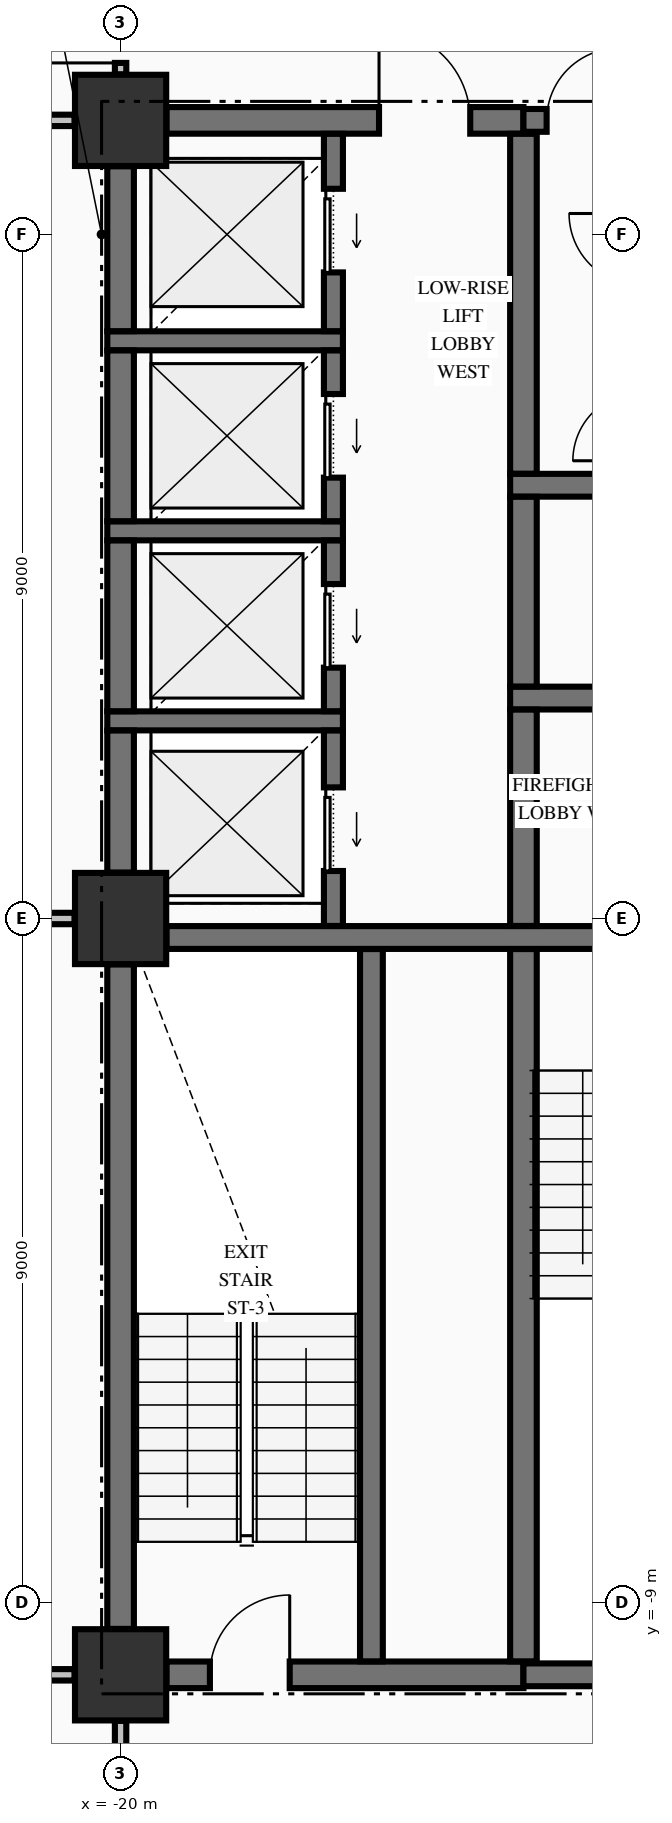
"""IFC4 building model, lengths in metres.
Left out: names, types, materials, properties, quantities, classifications, styles, units other than length and angle.
Written with IfcOpenShell. Run it as: python <this file> out.ifc"""

import sys

from ifc_helpers import new_model, si_unit, direction, frame, frame_2d, origin, origin_2d, place, context, subcontext, project, spatial, rectangle, extrude, element, fill, save


model = new_model("IFC4")
c1 = context("Model", 3, precision=1e-05, world=origin(), true_north=direction((0.0, 1.0)))
c2 = subcontext(c1, "Body", "Model", "MODEL_VIEW")
j1 = project(units=[si_unit("LENGTHUNIT", "METRE"), si_unit("PLANEANGLEUNIT", "RADIAN")], contexts=[c1])
p1 = place(None, origin())
s1 = spatial("IfcSite", under=j1, at=p1, CompositionType="ELEMENT")
p2 = place(p1, origin())
s2 = spatial("IfcBuilding", under=s1, at=p2, CompositionType="ELEMENT")
p3 = place(p2, frame((0.0, 0.0, 41.48)))
s3 = spatial("IfcBuildingStorey", under=s2, at=p3, CompositionType="ELEMENT", Elevation=41.48)
for number, where, z_axis, x_axis in (
    (1, (-20.0, -9.95, -0.25), (0.0, 0.0, 1.0), (1.0, 0.0, 0.0)),
    (2, (-20.0, 10.5, -0.25), (0.0, 0.0, 1.0), (1.0, 0.0, 0.0)),
    (3, (-20.0, 0.0, -0.25), (0.0, 0.0, 1.0), (1.0, 0.0, 0.0)),
):
    element("IfcColumn", number, at=place(p3, frame(where, z_axis=z_axis, x_axis=x_axis)), inside=s3, PredefinedType="COLUMN", context=c2, shape_type="SweptSolid", body=[
        extrude(rectangle(XDim=1.2, YDim=1.2, at=origin_2d()), origin(), (0.0, 0.0, 1.0), 3.57),
    ])
p4 = place(p3, frame((-19.396, -9.95, 0.0), z_axis=(0.0, 0.0, 1.0), x_axis=(1.0, 0.0, 0.0)))
e4 = element("IfcWall", 4, at=p4, inside=s3, PredefinedType="SHEAR", context=c2, shape_type="SweptSolid", body=[
    extrude(rectangle(XDim=4.696, YDim=0.35, at=frame_2d((2.348, 0.0))), origin(), (0.0, 0.0, 1.0), 3.32),
])
p5 = place(p4, frame((0.571, 0.0, 0.0)))
e5 = element("IfcOpeningElement", 5, at=p5, cuts=e4, PredefinedType="OPENING", context=c2, shape_type="SweptSolid", body=[
    extrude(rectangle(XDim=1.05, YDim=2.15, at=frame_2d((0.525, 1.075))), frame((0.0, 0.185, 0.0), z_axis=(0.0, -1.0, 0.0), x_axis=(1.0, 0.0, 0.0)), (0.0, 0.0, 1.0), 0.37),
])
p6 = place(p3, frame((-14.7, -9.95, 0.0), z_axis=(0.0, 0.0, 1.0), x_axis=(1.0, 0.0, 0.0)))
e6 = element("IfcWall", 6, at=p6, inside=s3, PredefinedType="SHEAR", context=c2, shape_type="SweptSolid", body=[
    extrude(rectangle(XDim=3.096, YDim=0.3, at=frame_2d((1.548, 0.0))), origin(), (0.0, 0.0, 1.0), 3.32),
])
p7 = place(p3, frame((-19.396, -0.25, 0.0), z_axis=(0.0, 0.0, 1.0), x_axis=(1.0, 0.0, 0.0)))
e7 = element("IfcWall", 7, at=p7, inside=s3, PredefinedType="SHEAR", context=c2, shape_type="SweptSolid", body=[
    extrude(rectangle(XDim=7.792, YDim=0.3, at=frame_2d((3.896, 0.0))), origin(), (0.0, 0.0, 1.0), 3.32),
])
p8 = place(p7, frame((5.696, 0.0, 0.0)))
e8 = element("IfcOpeningElement", 8, at=p8, cuts=e7, PredefinedType="OPENING", context=c2, shape_type="SweptSolid", body=[
    extrude(rectangle(XDim=1.1, YDim=2.15, at=frame_2d((0.55, 1.075))), frame((0.0, 0.16, 0.0), z_axis=(0.0, -1.0, 0.0), x_axis=(1.0, 0.0, 0.0)), (0.0, 0.0, 1.0), 0.32),
])
p9 = place(p3, frame((-20.175, 2.6, 0.0), z_axis=(0.0, 0.0, 1.0), x_axis=(1.0, 0.0, 0.0)))
e9 = element("IfcWall", 9, at=p9, inside=s3, PredefinedType="SOLIDWALL", context=c2, shape_type="SweptSolid", body=[
    extrude(rectangle(XDim=3.1, YDim=0.25, at=frame_2d((1.55, 0.0))), origin(), (0.0, 0.0, 1.0), 3.32),
])
p10 = place(p3, frame((-14.875, 2.9, 0.0), z_axis=(0.0, 0.0, 1.0), x_axis=(1.0, 0.0, 0.0)))
e10 = element("IfcWall", 10, at=p10, inside=s3, PredefinedType="SHEAR", context=c2, shape_type="SweptSolid", body=[
    extrude(rectangle(XDim=4.025, YDim=0.3, at=frame_2d((2.012, 0.0))), origin(), (0.0, 0.0, 1.0), 3.32),
])
p11 = place(p10, frame((2.075, 0.0, 0.0)))
e11 = element("IfcOpeningElement", 11, at=p11, cuts=e10, PredefinedType="OPENING", context=c2, shape_type="SweptSolid", body=[
    extrude(rectangle(XDim=1.1, YDim=2.2, at=frame_2d((0.55, 1.1))), frame((0.0, 0.16, 0.0), z_axis=(0.0, -1.0, 0.0), x_axis=(1.0, 0.0, 0.0)), (0.0, 0.0, 1.0), 0.32),
])
p12 = place(p3, frame((-20.175, 5.1, 0.0), z_axis=(0.0, 0.0, 1.0), x_axis=(1.0, 0.0, 0.0)))
e12 = element("IfcWall", 12, at=p12, inside=s3, PredefinedType="SOLIDWALL", context=c2, shape_type="SweptSolid", body=[
    extrude(rectangle(XDim=3.1, YDim=0.25, at=frame_2d((1.55, 0.0))), origin(), (0.0, 0.0, 1.0), 3.32),
])
p13 = place(p3, frame((-14.875, 5.7, 0.0), z_axis=(0.0, 0.0, 1.0), x_axis=(1.0, 0.0, 0.0)))
e13 = element("IfcWall", 13, at=p13, inside=s3, PredefinedType="SHEAR", context=c2, shape_type="SweptSolid", body=[
    extrude(rectangle(XDim=4.025, YDim=0.3, at=frame_2d((2.012, 0.0))), origin(), (0.0, 0.0, 1.0), 3.32),
])
p14 = place(p3, frame((-20.175, 7.6, 0.0), z_axis=(0.0, 0.0, 1.0), x_axis=(1.0, 0.0, 0.0)))
e14 = element("IfcWall", 14, at=p14, inside=s3, PredefinedType="SOLIDWALL", context=c2, shape_type="SweptSolid", body=[
    extrude(rectangle(XDim=3.1, YDim=0.25, at=frame_2d((1.55, 0.0))), origin(), (0.0, 0.0, 1.0), 3.32),
])
p15 = place(p3, frame((-19.396, 10.5, 0.0), z_axis=(0.0, 0.0, 1.0), x_axis=(1.0, 0.0, 0.0)))
e15 = element("IfcWall", 15, at=p15, inside=s3, PredefinedType="SHEAR", context=c2, shape_type="SweptSolid", body=[
    extrude(rectangle(XDim=4.696, YDim=0.35, at=frame_2d((2.348, 0.0))), origin(), (0.0, 0.0, 1.0), 3.32),
])
p16 = place(p15, frame((2.796, 0.0, 0.0)))
e16 = element("IfcOpeningElement", 16, at=p16, cuts=e15, PredefinedType="OPENING", context=c2, shape_type="SweptSolid", body=[
    extrude(rectangle(XDim=1.2, YDim=2.15, at=frame_2d((0.6, 1.075))), frame((0.0, 0.185, 0.0), z_axis=(0.0, -1.0, 0.0), x_axis=(1.0, 0.0, 0.0)), (0.0, 0.0, 1.0), 0.37),
])
p17 = place(p3, frame((-14.7, 10.5, 0.0), z_axis=(0.0, 0.0, 1.0), x_axis=(1.0, 0.0, 0.0)))
e17 = element("IfcWall", 17, at=p17, inside=s3, PredefinedType="SHEAR", context=c2, shape_type="SweptSolid", body=[
    extrude(rectangle(XDim=3.096, YDim=0.3, at=frame_2d((1.548, 0.0))), origin(), (0.0, 0.0, 1.0), 3.32),
])
p18 = place(p17, frame((0.305, 0.0, 0.0)))
e18 = element("IfcOpeningElement", 18, at=p18, cuts=e17, PredefinedType="OPENING", context=c2, shape_type="SweptSolid", body=[
    extrude(rectangle(XDim=0.95, YDim=2.15, at=frame_2d((0.475, 1.075))), frame((0.0, 0.16, 0.0), z_axis=(0.0, -1.0, 0.0), x_axis=(1.0, 0.0, 0.0)), (0.0, 0.0, 1.0), 0.32),
])
p19 = place(p3, frame((-23.835, -9.95, 0.0), z_axis=(0.0, 0.0, 1.0), x_axis=(1.0, 0.0, 0.0)))
e19 = element("IfcWall", 19, at=p19, inside=s3, PredefinedType="PARTITIONING", context=c2, shape_type="SweptSolid", body=[
    extrude(rectangle(XDim=3.229, YDim=0.15, at=frame_2d((1.615, 0.0))), origin(), (0.0, 0.0, 1.0), 3.32),
])
p20 = place(p19, frame((1.36, 0.0, 0.0)))
e20 = element("IfcOpeningElement", 20, at=p20, cuts=e19, PredefinedType="OPENING", context=c2, shape_type="SweptSolid", body=[
    extrude(rectangle(XDim=0.95, YDim=2.15, at=frame_2d((0.475, 1.075))), frame((0.0, 0.085, 0.0), z_axis=(0.0, -1.0, 0.0), x_axis=(1.0, 0.0, 0.0)), (0.0, 0.0, 1.0), 0.17),
])
p21 = place(p3, frame((-23.294, 0.0, 0.0), z_axis=(0.0, 0.0, 1.0), x_axis=(1.0, 0.0, 0.0)))
e21 = element("IfcWall", 21, at=p21, inside=s3, PredefinedType="PARTITIONING", context=c2, shape_type="SweptSolid", body=[
    extrude(rectangle(XDim=2.688, YDim=0.15, at=frame_2d((1.344, 0.0))), origin(), (0.0, 0.0, 1.0), 2.66),
])
p22 = place(p3, frame((-23.835, 10.5, 0.0), z_axis=(0.0, 0.0, 1.0), x_axis=(1.0, 0.0, 0.0)))
e22 = element("IfcWall", 22, at=p22, inside=s3, PredefinedType="PARTITIONING", context=c2, shape_type="SweptSolid", body=[
    extrude(rectangle(XDim=3.229, YDim=0.15, at=frame_2d((1.615, 0.0))), origin(), (0.0, 0.0, 1.0), 3.32),
])
p23 = place(p22, frame((1.36, 0.0, 0.0)))
e23 = element("IfcOpeningElement", 23, at=p23, cuts=e22, PredefinedType="OPENING", context=c2, shape_type="SweptSolid", body=[
    extrude(rectangle(XDim=0.95, YDim=2.15, at=frame_2d((0.475, 1.075))), frame((0.0, 0.085, 0.0), z_axis=(0.0, -1.0, 0.0), x_axis=(1.0, 0.0, 0.0)), (0.0, 0.0, 1.0), 0.17),
])
p24 = place(p3, frame((-20.0, -9.346, 0.0), z_axis=(0.0, 0.0, 1.0), x_axis=(0.0, 1.0, 0.0)))
e24 = element("IfcWall", 24, at=p24, inside=s3, PredefinedType="SHEAR", context=c2, shape_type="SweptSolid", body=[
    extrude(rectangle(XDim=8.742, YDim=0.35, at=frame_2d((4.371, 0.0))), origin(), (0.0, 0.0, 1.0), 3.32),
])
p25 = place(p3, frame((-20.0, 0.604, 0.0), z_axis=(0.0, 0.0, 1.0), x_axis=(0.0, 1.0, 0.0)))
e25 = element("IfcWall", 25, at=p25, inside=s3, PredefinedType="SHEAR", context=c2, shape_type="SweptSolid", body=[
    extrude(rectangle(XDim=1.869, YDim=0.35, at=frame_2d((0.935, 0.0))), origin(), (0.0, 0.0, 1.0), 3.32),
])
for number, where, z_axis, x_axis in (
    (26, (-20.0, 2.727, 0.0), (0.0, 0.0, 1.0), (0.0, 1.0, 0.0)),
    (27, (-20.0, 5.227, 0.0), (0.0, 0.0, 1.0), (0.0, 1.0, 0.0)),
):
    element("IfcWall", number, at=place(p3, frame(where, z_axis=z_axis, x_axis=x_axis)), inside=s3, PredefinedType="SHEAR", context=c2, shape_type="SweptSolid", body=[
        extrude(rectangle(XDim=2.246, YDim=0.35, at=frame_2d((1.123, 0.0))), origin(), (0.0, 0.0, 1.0), 3.32),
    ])
p26 = place(p3, frame((-20.0, 7.727, 0.0), z_axis=(0.0, 0.0, 1.0), x_axis=(0.0, 1.0, 0.0)))
e28 = element("IfcWall", 28, at=p26, inside=s3, PredefinedType="SHEAR", context=c2, shape_type="SweptSolid", body=[
    extrude(rectangle(XDim=2.169, YDim=0.35, at=frame_2d((1.084, 0.0))), origin(), (0.0, 0.0, 1.0), 3.32),
])
p27 = place(p3, frame((-17.2, -0.098, 0.0), z_axis=(0.0, 0.0, 1.0), x_axis=(0.0, 1.0, 0.0)))
e29 = element("IfcWall", 29, at=p27, inside=s3, PredefinedType="SOLIDWALL", context=c2, shape_type="SweptSolid", body=[
    extrude(rectangle(XDim=2.571, YDim=0.25, at=frame_2d((1.285, 0.0))), origin(), (0.0, 0.0, 1.0), 3.32),
])
p28 = place(p27, frame((0.723, 0.0, 0.0)))
e30 = element("IfcOpeningElement", 30, at=p28, cuts=e29, PredefinedType="OPENING", context=c2, shape_type="SweptSolid", body=[
    extrude(rectangle(XDim=1.1, YDim=2.2, at=frame_2d((0.55, 1.1))), frame((0.0, 0.135, 0.0), z_axis=(0.0, -1.0, 0.0), x_axis=(1.0, 0.0, 0.0)), (0.0, 0.0, 1.0), 0.27),
])
p29 = place(p3, frame((-17.2, 2.727, 0.0), z_axis=(0.0, 0.0, 1.0), x_axis=(0.0, 1.0, 0.0)))
e31 = element("IfcWall", 31, at=p29, inside=s3, PredefinedType="SOLIDWALL", context=c2, shape_type="SweptSolid", body=[
    extrude(rectangle(XDim=2.246, YDim=0.25, at=frame_2d((1.123, 0.0))), origin(), (0.0, 0.0, 1.0), 3.32),
])
p30 = place(p29, frame((0.573, 0.0, 0.0)))
e32 = element("IfcOpeningElement", 32, at=p30, cuts=e31, PredefinedType="OPENING", context=c2, shape_type="SweptSolid", body=[
    extrude(rectangle(XDim=1.1, YDim=2.2, at=frame_2d((0.55, 1.1))), frame((0.0, 0.135, 0.0), z_axis=(0.0, -1.0, 0.0), x_axis=(1.0, 0.0, 0.0)), (0.0, 0.0, 1.0), 0.27),
])
p31 = place(p3, frame((-17.2, 5.227, 0.0), z_axis=(0.0, 0.0, 1.0), x_axis=(0.0, 1.0, 0.0)))
e33 = element("IfcWall", 33, at=p31, inside=s3, PredefinedType="SOLIDWALL", context=c2, shape_type="SweptSolid", body=[
    extrude(rectangle(XDim=2.246, YDim=0.25, at=frame_2d((1.123, 0.0))), origin(), (0.0, 0.0, 1.0), 3.32),
])
p32 = place(p31, frame((0.573, 0.0, 0.0)))
e34 = element("IfcOpeningElement", 34, at=p32, cuts=e33, PredefinedType="OPENING", context=c2, shape_type="SweptSolid", body=[
    extrude(rectangle(XDim=1.1, YDim=2.2, at=frame_2d((0.55, 1.1))), frame((0.0, 0.135, 0.0), z_axis=(0.0, -1.0, 0.0), x_axis=(1.0, 0.0, 0.0)), (0.0, 0.0, 1.0), 0.27),
])
p33 = place(p3, frame((-17.2, 7.727, 0.0), z_axis=(0.0, 0.0, 1.0), x_axis=(0.0, 1.0, 0.0)))
e35 = element("IfcWall", 35, at=p33, inside=s3, PredefinedType="SOLIDWALL", context=c2, shape_type="SweptSolid", body=[
    extrude(rectangle(XDim=2.596, YDim=0.25, at=frame_2d((1.298, 0.0))), origin(), (0.0, 0.0, 1.0), 3.32),
])
p34 = place(p33, frame((0.773, 0.0, 0.0)))
e36 = element("IfcOpeningElement", 36, at=p34, cuts=e35, PredefinedType="OPENING", context=c2, shape_type="SweptSolid", body=[
    extrude(rectangle(XDim=1.1, YDim=2.2, at=frame_2d((0.55, 1.1))), frame((0.0, 0.135, 0.0), z_axis=(0.0, -1.0, 0.0), x_axis=(1.0, 0.0, 0.0)), (0.0, 0.0, 1.0), 0.27),
])
p35 = place(p3, frame((-16.7, -9.773, 0.0), z_axis=(0.0, 0.0, 1.0), x_axis=(0.0, 1.0, 0.0)))
e37 = element("IfcWall", 37, at=p35, inside=s3, PredefinedType="SHEAR", context=c2, shape_type="SweptSolid", body=[
    extrude(rectangle(XDim=9.371, YDim=0.3, at=frame_2d((4.686, 0.0))), origin(), (0.0, 0.0, 1.0), 3.32),
])
p36 = place(p3, frame((-14.7, -9.773, 0.0), z_axis=(0.0, 0.0, 1.0), x_axis=(0.0, 1.0, 0.0)))
e38 = element("IfcWall", 38, at=p36, inside=s3, PredefinedType="SHEAR", context=c2, shape_type="SweptSolid", body=[
    extrude(rectangle(XDim=9.371, YDim=0.35, at=frame_2d((4.686, 0.0))), origin(), (0.0, 0.0, 1.0), 3.32),
])
p37 = place(p3, frame((-14.7, -0.098, 0.0), z_axis=(0.0, 0.0, 1.0), x_axis=(0.0, 1.0, 0.0)))
e39 = element("IfcWall", 39, at=p37, inside=s3, PredefinedType="SHEAR", context=c2, shape_type="SweptSolid", body=[
    extrude(rectangle(XDim=2.846, YDim=0.35, at=frame_2d((1.423, 0.0))), origin(), (0.0, 0.0, 1.0), 3.32),
])
p38 = place(p3, frame((-14.7, 3.052, 0.0), z_axis=(0.0, 0.0, 1.0), x_axis=(0.0, 1.0, 0.0)))
e40 = element("IfcWall", 40, at=p38, inside=s3, PredefinedType="SHEAR", context=c2, shape_type="SweptSolid", body=[
    extrude(rectangle(XDim=2.496, YDim=0.35, at=frame_2d((1.248, 0.0))), origin(), (0.0, 0.0, 1.0), 3.32),
])
p39 = place(p3, frame((-14.7, 5.852, 0.0), z_axis=(0.0, 0.0, 1.0), x_axis=(0.0, 1.0, 0.0)))
e41 = element("IfcWall", 41, at=p39, inside=s3, PredefinedType="SHEAR", context=c2, shape_type="SweptSolid", body=[
    extrude(rectangle(XDim=4.471, YDim=0.35, at=frame_2d((2.235, 0.0))), origin(), (0.0, 0.0, 1.0), 3.32),
])
p40 = place(p3, frame((-20.0, -13.022, 0.0), z_axis=(0.0, 0.0, 1.0), x_axis=(0.0, 1.0, 0.0)))
e42 = element("IfcWall", 42, at=p40, inside=s3, PredefinedType="PARTITIONING", context=c2, shape_type="SweptSolid", body=[
    extrude(rectangle(XDim=2.466, YDim=0.15, at=frame_2d((1.233, 0.0))), origin(), (0.0, 0.0, 1.0), 3.32),
])
p41 = place(p40, frame((1.027, 0.0, 0.0)))
e43 = element("IfcOpeningElement", 43, at=p41, cuts=e42, PredefinedType="OPENING", context=c2, shape_type="SweptSolid", body=[
    extrude(rectangle(XDim=0.95, YDim=2.15, at=frame_2d((0.475, 1.075))), frame((0.0, 0.085, 0.0), z_axis=(0.0, -1.0, 0.0), x_axis=(1.0, 0.0, 0.0)), (0.0, 0.0, 1.0), 0.17),
])
p42 = place(p3, frame((-20.0, 11.106, 0.0), z_axis=(0.0, 0.0, 1.0), x_axis=(0.0, 1.0, 0.0)))
e44 = element("IfcWall", 44, at=p42, inside=s3, PredefinedType="PARTITIONING", context=c2, shape_type="SweptSolid", body=[
    extrude(rectangle(XDim=1.766, YDim=0.15, at=frame_2d((0.883, 0.0))), origin(), (0.0, 0.0, 1.0), 3.32),
])
p43 = place(p42, frame((0.15, 0.0, 0.0)))
e45 = element("IfcOpeningElement", 45, at=p43, cuts=e44, PredefinedType="OPENING", context=c2, shape_type="SweptSolid", body=[
    extrude(rectangle(XDim=0.95, YDim=2.15, at=frame_2d((0.475, 1.075))), frame((0.0, 0.085, 0.0), z_axis=(0.0, -1.0, 0.0), x_axis=(1.0, 0.0, 0.0)), (0.0, 0.0, 1.0), 0.17),
])
p44 = place(p18, origin())
e46 = element("IfcDoor", 46, at=p44, inside=s3, OperationType="SINGLE_SWING_RIGHT", PredefinedType="DOOR", context=c2, shape_type="SweptSolid", body=[
    extrude(rectangle(XDim=0.95, YDim=2.15, at=frame_2d((0.475, 1.075))), frame((0.0, 0.025, 0.0), z_axis=(0.0, -1.0, 0.0), x_axis=(1.0, 0.0, 0.0)), (0.0, 0.0, 1.0), 0.05),
])
fill(e18, e46)
p45 = place(p5, origin())
e47 = element("IfcDoor", 47, at=p45, inside=s3, OperationType="SINGLE_SWING_RIGHT", PredefinedType="DOOR", context=c2, shape_type="SweptSolid", body=[
    extrude(rectangle(XDim=1.05, YDim=2.15, at=frame_2d((0.525, 1.075))), frame((0.0, 0.025, 0.0), z_axis=(0.0, -1.0, 0.0), x_axis=(1.0, 0.0, 0.0)), (0.0, 0.0, 1.0), 0.05),
])
fill(e5, e47)
p46 = place(p16, origin())
e48 = element("IfcDoor", 48, at=p46, inside=s3, OperationType="SINGLE_SWING_LEFT", PredefinedType="DOOR", context=c2, shape_type="SweptSolid", body=[
    extrude(rectangle(XDim=1.2, YDim=2.15, at=frame_2d((0.6, 1.075))), frame((0.0, 0.025, 0.0), z_axis=(0.0, -1.0, 0.0), x_axis=(1.0, 0.0, 0.0)), (0.0, 0.0, 1.0), 0.05),
])
fill(e16, e48)
p47 = place(p28, origin())
e49 = element("IfcDoor", 49, at=p47, inside=s3, OperationType="SLIDING_TO_LEFT", PredefinedType="DOOR", context=c2, shape_type="SweptSolid", body=[
    extrude(rectangle(XDim=1.1, YDim=2.2, at=frame_2d((0.55, 1.1))), frame((0.0, 0.025, 0.0), z_axis=(0.0, -1.0, 0.0), x_axis=(1.0, 0.0, 0.0)), (0.0, 0.0, 1.0), 0.05),
])
fill(e30, e49)
p48 = place(p30, origin())
e50 = element("IfcDoor", 50, at=p48, inside=s3, OperationType="SLIDING_TO_LEFT", PredefinedType="DOOR", context=c2, shape_type="SweptSolid", body=[
    extrude(rectangle(XDim=1.1, YDim=2.2, at=frame_2d((0.55, 1.1))), frame((0.0, 0.025, 0.0), z_axis=(0.0, -1.0, 0.0), x_axis=(1.0, 0.0, 0.0)), (0.0, 0.0, 1.0), 0.05),
])
fill(e32, e50)
p49 = place(p32, origin())
e51 = element("IfcDoor", 51, at=p49, inside=s3, OperationType="SLIDING_TO_LEFT", PredefinedType="DOOR", context=c2, shape_type="SweptSolid", body=[
    extrude(rectangle(XDim=1.1, YDim=2.2, at=frame_2d((0.55, 1.1))), frame((0.0, 0.025, 0.0), z_axis=(0.0, -1.0, 0.0), x_axis=(1.0, 0.0, 0.0)), (0.0, 0.0, 1.0), 0.05),
])
fill(e34, e51)
p50 = place(p34, origin())
e52 = element("IfcDoor", 52, at=p50, inside=s3, OperationType="SLIDING_TO_LEFT", PredefinedType="DOOR", context=c2, shape_type="SweptSolid", body=[
    extrude(rectangle(XDim=1.1, YDim=2.2, at=frame_2d((0.55, 1.1))), frame((0.0, 0.025, 0.0), z_axis=(0.0, -1.0, 0.0), x_axis=(1.0, 0.0, 0.0)), (0.0, 0.0, 1.0), 0.05),
])
fill(e36, e52)
p51 = place(p43, origin())
e53 = element("IfcDoor", 53, at=p51, inside=s3, OperationType="SINGLE_SWING_LEFT", PredefinedType="DOOR", context=c2, shape_type="SweptSolid", body=[
    extrude(rectangle(XDim=0.95, YDim=2.15, at=frame_2d((0.475, 1.075))), frame((0.0, 0.025, 0.0), z_axis=(0.0, -1.0, 0.0), x_axis=(1.0, 0.0, 0.0)), (0.0, 0.0, 1.0), 0.05),
])
fill(e45, e53)
save(model, sys.argv[1])
